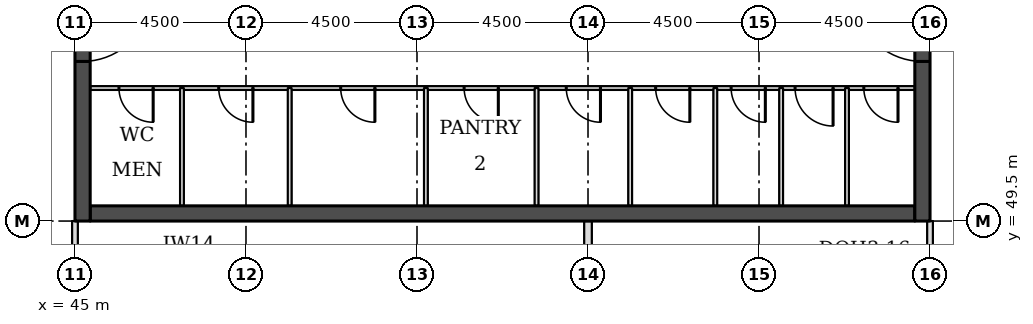
"""IFC4 building model, lengths in metres.
Left out: names, types, materials, properties, quantities, classifications, styles, units other than length and angle.
Written with IfcOpenShell. Run it as: python <this file> out.ifc"""

import sys

from ifc_helpers import new_model, si_unit, direction, frame, frame_2d, origin, place, context, subcontext, project, spatial, rectangle, extrude, element, fill, save


model = new_model("IFC4")
c1 = context("Model", 3, precision=1e-05, world=origin(), true_north=direction((0.0, 1.0)))
c2 = subcontext(c1, "Body", "Model", "MODEL_VIEW")
j1 = project(units=[si_unit("LENGTHUNIT", "METRE"), si_unit("PLANEANGLEUNIT", "RADIAN")], contexts=[c1])
p1 = place(None, origin())
s1 = spatial("IfcSite", under=j1, at=p1, CompositionType="ELEMENT")
p2 = place(p1, origin())
s2 = spatial("IfcBuilding", under=s1, at=p2, CompositionType="ELEMENT")
p3 = place(p2, frame((0.0, 0.0, 162.5)))
s3 = spatial("IfcBuildingStorey", under=s2, at=p3, CompositionType="ELEMENT", Elevation=162.5)
p4 = place(p3, frame((45.4, 49.7, 0.0), z_axis=(0.0, 0.0, 1.0), x_axis=(1.0, 0.0, 0.0)))
e1 = element("IfcWall", 1, at=p4, inside=s3, PredefinedType="SHEAR", context=c2, shape_type="SweptSolid", body=[
    extrude(rectangle(XDim=21.7, YDim=0.4, at=frame_2d((10.85, 0.0))), origin(), (0.0, 0.0, 1.0), 3.7),
])
p5 = place(p3, frame((45.2, 49.5, 0.0), z_axis=(0.0, 0.0, 1.0), x_axis=(0.0, 1.0, 0.0)))
e2 = element("IfcWall", 2, at=p5, inside=s3, PredefinedType="SHEAR", context=c2, shape_type="SweptSolid", body=[
    extrude(rectangle(XDim=22.5, YDim=0.4, at=frame_2d((11.25, 0.0))), origin(), (0.0, 0.0, 1.0), 3.7),
])
p6 = place(p5, frame((4.2, 0.0, 0.0)))
e3 = element("IfcOpeningElement", 3, at=p6, cuts=e2, PredefinedType="OPENING", context=c2, shape_type="SweptSolid", body=[
    extrude(rectangle(XDim=1.8, YDim=2.1, at=frame_2d((0.9, 1.05))), frame((0.0, 0.21, 0.0), z_axis=(0.0, -1.0, 0.0), x_axis=(1.0, 0.0, 0.0)), (0.0, 0.0, 1.0), 0.42),
])
p7 = place(p5, frame((6.9, 0.0, 0.0)))
e4 = element("IfcOpeningElement", 4, at=p7, cuts=e2, PredefinedType="OPENING", context=c2, shape_type="SweptSolid", body=[
    extrude(rectangle(XDim=1.1, YDim=2.1, at=frame_2d((0.55, 1.05))), frame((0.0, 0.21, 0.0), z_axis=(0.0, -1.0, 0.0), x_axis=(1.0, 0.0, 0.0)), (0.0, 0.0, 1.0), 0.42),
])
p8 = place(p5, frame((13.6, 0.0, 0.0)))
e5 = element("IfcOpeningElement", 5, at=p8, cuts=e2, PredefinedType="OPENING", context=c2, shape_type="SweptSolid", body=[
    extrude(rectangle(XDim=1.1, YDim=2.1, at=frame_2d((0.55, 1.05))), frame((0.0, 0.21, 0.0), z_axis=(0.0, -1.0, 0.0), x_axis=(1.0, 0.0, 0.0)), (0.0, 0.0, 1.0), 0.42),
])
p9 = place(p5, frame((16.5, 0.0, 0.0)))
e6 = element("IfcOpeningElement", 6, at=p9, cuts=e2, PredefinedType="OPENING", context=c2, shape_type="SweptSolid", body=[
    extrude(rectangle(XDim=1.8, YDim=2.1, at=frame_2d((0.9, 1.05))), frame((0.0, 0.21, 0.0), z_axis=(0.0, -1.0, 0.0), x_axis=(1.0, 0.0, 0.0)), (0.0, 0.0, 1.0), 0.42),
])
p10 = place(p3, frame((67.3, 49.5, 0.0), z_axis=(0.0, 0.0, 1.0), x_axis=(0.0, 1.0, 0.0)))
e7 = element("IfcWall", 7, at=p10, inside=s3, PredefinedType="SHEAR", context=c2, shape_type="SweptSolid", body=[
    extrude(rectangle(XDim=22.5, YDim=0.4, at=frame_2d((11.25, 0.0))), origin(), (0.0, 0.0, 1.0), 3.7),
])
p11 = place(p10, frame((4.2, 0.0, 0.0)))
e8 = element("IfcOpeningElement", 8, at=p11, cuts=e7, PredefinedType="OPENING", context=c2, shape_type="SweptSolid", body=[
    extrude(rectangle(XDim=1.8, YDim=2.1, at=frame_2d((0.9, 1.05))), frame((0.0, 0.21, 0.0), z_axis=(0.0, -1.0, 0.0), x_axis=(1.0, 0.0, 0.0)), (0.0, 0.0, 1.0), 0.42),
])
p12 = place(p10, frame((6.9, 0.0, 0.0)))
e9 = element("IfcOpeningElement", 9, at=p12, cuts=e7, PredefinedType="OPENING", context=c2, shape_type="SweptSolid", body=[
    extrude(rectangle(XDim=1.1, YDim=2.1, at=frame_2d((0.55, 1.05))), frame((0.0, 0.21, 0.0), z_axis=(0.0, -1.0, 0.0), x_axis=(1.0, 0.0, 0.0)), (0.0, 0.0, 1.0), 0.42),
])
p13 = place(p10, frame((13.6, 0.0, 0.0)))
e10 = element("IfcOpeningElement", 10, at=p13, cuts=e7, PredefinedType="OPENING", context=c2, shape_type="SweptSolid", body=[
    extrude(rectangle(XDim=1.1, YDim=2.1, at=frame_2d((0.55, 1.05))), frame((0.0, 0.21, 0.0), z_axis=(0.0, -1.0, 0.0), x_axis=(1.0, 0.0, 0.0)), (0.0, 0.0, 1.0), 0.42),
])
p14 = place(p10, frame((16.5, 0.0, 0.0)))
e11 = element("IfcOpeningElement", 11, at=p14, cuts=e7, PredefinedType="OPENING", context=c2, shape_type="SweptSolid", body=[
    extrude(rectangle(XDim=1.8, YDim=2.1, at=frame_2d((0.9, 1.05))), frame((0.0, 0.21, 0.0), z_axis=(0.0, -1.0, 0.0), x_axis=(1.0, 0.0, 0.0)), (0.0, 0.0, 1.0), 0.42),
])
p15 = place(p3, frame((58.5, 45.0, 0.0), z_axis=(0.0, 0.0, 1.0), x_axis=(0.0, 1.0, 0.0)))
e12 = element("IfcWall", 12, at=p15, inside=s3, PredefinedType="PARTITIONING", context=c2, shape_type="SweptSolid", body=[
    extrude(rectangle(XDim=4.5, YDim=0.2, at=frame_2d((2.25, 0.0))), origin(), (0.0, 0.0, 1.0), 3.55),
])
for number, where, z_axis, x_axis in (
    (13, (45.0, 48.0, 0.0), (0.0, 0.0, 1.0), (0.0, 1.0, 0.0)),
    (14, (67.5, 48.0, 0.0), (0.0, 0.0, 1.0), (0.0, 1.0, 0.0)),
):
    element("IfcWall", number, at=place(p3, frame(where, z_axis=z_axis, x_axis=x_axis)), inside=s3, PredefinedType="PARTITIONING", context=c2, shape_type="SweptSolid", body=[
        extrude(rectangle(XDim=1.5, YDim=0.15, at=frame_2d((0.75, 0.0))), origin(), (0.0, 0.0, 1.0), 3.022),
    ])
p16 = place(p3, frame((45.4, 53.0, 0.0), z_axis=(0.0, 0.0, 1.0), x_axis=(1.0, 0.0, 0.0)))
e15 = element("IfcWall", 15, at=p16, inside=s3, PredefinedType="PARTITIONING", context=c2, shape_type="SweptSolid", body=[
    extrude(rectangle(XDim=21.7, YDim=0.1, at=frame_2d((10.85, 0.0))), origin(), (0.0, 0.0, 1.0), 3.55),
])
p17 = place(p16, frame((20.357, 0.0, 0.0)))
e16 = element("IfcOpeningElement", 16, at=p17, cuts=e15, PredefinedType="OPENING", context=c2, shape_type="SweptSolid", body=[
    extrude(rectangle(XDim=0.9, YDim=2.1, at=frame_2d((0.45, 1.05))), frame((0.0, 0.06, 0.0), z_axis=(0.0, -1.0, 0.0), x_axis=(1.0, 0.0, 0.0)), (0.0, 0.0, 1.0), 0.12),
])
p18 = place(p16, frame((18.549, 0.0, 0.0)))
e17 = element("IfcOpeningElement", 17, at=p18, cuts=e15, PredefinedType="OPENING", context=c2, shape_type="SweptSolid", body=[
    extrude(rectangle(XDim=1.0, YDim=2.1, at=frame_2d((0.5, 1.05))), frame((0.0, 0.06, 0.0), z_axis=(0.0, -1.0, 0.0), x_axis=(1.0, 0.0, 0.0)), (0.0, 0.0, 1.0), 0.12),
])
p19 = place(p16, frame((16.866, 0.0, 0.0)))
e18 = element("IfcOpeningElement", 18, at=p19, cuts=e15, PredefinedType="OPENING", context=c2, shape_type="SweptSolid", body=[
    extrude(rectangle(XDim=0.9, YDim=2.1, at=frame_2d((0.45, 1.05))), frame((0.0, 0.06, 0.0), z_axis=(0.0, -1.0, 0.0), x_axis=(1.0, 0.0, 0.0)), (0.0, 0.0, 1.0), 0.12),
])
p20 = place(p16, frame((0.758, 0.0, 0.0)))
e19 = element("IfcOpeningElement", 19, at=p20, cuts=e15, PredefinedType="OPENING", context=c2, shape_type="SweptSolid", body=[
    extrude(rectangle(XDim=0.9, YDim=2.1, at=frame_2d((0.45, 1.05))), frame((0.0, 0.06, 0.0), z_axis=(0.0, -1.0, 0.0), x_axis=(1.0, 0.0, 0.0)), (0.0, 0.0, 1.0), 0.12),
])
p21 = place(p16, frame((3.383, 0.0, 0.0)))
e20 = element("IfcOpeningElement", 20, at=p21, cuts=e15, PredefinedType="OPENING", context=c2, shape_type="SweptSolid", body=[
    extrude(rectangle(XDim=0.9, YDim=2.1, at=frame_2d((0.45, 1.05))), frame((0.0, 0.06, 0.0), z_axis=(0.0, -1.0, 0.0), x_axis=(1.0, 0.0, 0.0)), (0.0, 0.0, 1.0), 0.12),
])
p22 = place(p16, frame((6.592, 0.0, 0.0)))
e21 = element("IfcOpeningElement", 21, at=p22, cuts=e15, PredefinedType="OPENING", context=c2, shape_type="SweptSolid", body=[
    extrude(rectangle(XDim=0.9, YDim=2.1, at=frame_2d((0.45, 1.05))), frame((0.0, 0.06, 0.0), z_axis=(0.0, -1.0, 0.0), x_axis=(1.0, 0.0, 0.0)), (0.0, 0.0, 1.0), 0.12),
])
p23 = place(p16, frame((9.84, 0.0, 0.0)))
e22 = element("IfcOpeningElement", 22, at=p23, cuts=e15, PredefinedType="OPENING", context=c2, shape_type="SweptSolid", body=[
    extrude(rectangle(XDim=0.9, YDim=2.1, at=frame_2d((0.45, 1.05))), frame((0.0, 0.06, 0.0), z_axis=(0.0, -1.0, 0.0), x_axis=(1.0, 0.0, 0.0)), (0.0, 0.0, 1.0), 0.12),
])
p24 = place(p16, frame((12.528, 0.0, 0.0)))
e23 = element("IfcOpeningElement", 23, at=p24, cuts=e15, PredefinedType="OPENING", context=c2, shape_type="SweptSolid", body=[
    extrude(rectangle(XDim=0.9, YDim=2.1, at=frame_2d((0.45, 1.05))), frame((0.0, 0.06, 0.0), z_axis=(0.0, -1.0, 0.0), x_axis=(1.0, 0.0, 0.0)), (0.0, 0.0, 1.0), 0.12),
])
p25 = place(p16, frame((14.88, 0.0, 0.0)))
e24 = element("IfcOpeningElement", 24, at=p25, cuts=e15, PredefinedType="OPENING", context=c2, shape_type="SweptSolid", body=[
    extrude(rectangle(XDim=0.9, YDim=2.1, at=frame_2d((0.45, 1.05))), frame((0.0, 0.06, 0.0), z_axis=(0.0, -1.0, 0.0), x_axis=(1.0, 0.0, 0.0)), (0.0, 0.0, 1.0), 0.12),
])
for number, where, z_axis, x_axis in (
    (25, (47.815, 49.9, 0.0), (0.0, 0.0, 1.0), (0.0, 1.0, 0.0)),
    (26, (50.65, 49.9, 0.0), (0.0, 0.0, 1.0), (0.0, 1.0, 0.0)),
    (27, (54.234, 49.9, 0.0), (0.0, 0.0, 1.0), (0.0, 1.0, 0.0)),
    (28, (57.146, 49.9, 0.0), (0.0, 0.0, 1.0), (0.0, 1.0, 0.0)),
    (29, (59.61, 49.9, 0.0), (0.0, 0.0, 1.0), (0.0, 1.0, 0.0)),
    (30, (61.85, 49.9, 0.0), (0.0, 0.0, 1.0), (0.0, 1.0, 0.0)),
    (31, (63.583, 49.9, 0.0), (0.0, 0.0, 1.0), (0.0, 1.0, 0.0)),
    (32, (65.315, 49.9, 0.0), (0.0, 0.0, 1.0), (0.0, 1.0, 0.0)),
):
    element("IfcWall", number, at=place(p3, frame(where, z_axis=z_axis, x_axis=x_axis)), inside=s3, PredefinedType="PARTITIONING", context=c2, shape_type="SweptSolid", body=[
        extrude(rectangle(XDim=3.1, YDim=0.1, at=frame_2d((1.55, 0.0))), origin(), (0.0, 0.0, 1.0), 3.55),
    ])
p26 = place(p6, frame((1.8, 0.0, 0.0), z_axis=(0.0, 0.0, 1.0), x_axis=(-1.0, 0.0, 0.0)))
e33 = element("IfcDoor", 33, at=p26, inside=s3, OperationType="SINGLE_SWING_LEFT", PredefinedType="DOOR", context=c2, shape_type="SweptSolid", body=[
    extrude(rectangle(XDim=1.8, YDim=2.1, at=frame_2d((0.9, 1.05))), frame((0.0, 0.025, 0.0), z_axis=(0.0, -1.0, 0.0), x_axis=(1.0, 0.0, 0.0)), (0.0, 0.0, 1.0), 0.05),
])
fill(e3, e33)
p27 = place(p11, origin())
e34 = element("IfcDoor", 34, at=p27, inside=s3, OperationType="SINGLE_SWING_RIGHT", PredefinedType="DOOR", context=c2, shape_type="SweptSolid", body=[
    extrude(rectangle(XDim=1.8, YDim=2.1, at=frame_2d((0.9, 1.05))), frame((0.0, 0.025, 0.0), z_axis=(0.0, -1.0, 0.0), x_axis=(1.0, 0.0, 0.0)), (0.0, 0.0, 1.0), 0.05),
])
fill(e8, e34)
p28 = place(p17, frame((0.9, 0.0, 0.0), z_axis=(0.0, 0.0, 1.0), x_axis=(-1.0, 0.0, 0.0)))
e35 = element("IfcDoor", 35, at=p28, inside=s3, OperationType="SINGLE_SWING_LEFT", PredefinedType="DOOR", context=c2, shape_type="SweptSolid", body=[
    extrude(rectangle(XDim=0.9, YDim=2.1, at=frame_2d((0.45, 1.05))), frame((0.0, 0.025, 0.0), z_axis=(0.0, -1.0, 0.0), x_axis=(1.0, 0.0, 0.0)), (0.0, 0.0, 1.0), 0.05),
])
fill(e16, e35)
p29 = place(p18, frame((1.0, 0.0, 0.0), z_axis=(0.0, 0.0, 1.0), x_axis=(-1.0, 0.0, 0.0)))
e36 = element("IfcDoor", 36, at=p29, inside=s3, OperationType="SINGLE_SWING_LEFT", PredefinedType="DOOR", context=c2, shape_type="SweptSolid", body=[
    extrude(rectangle(XDim=1.0, YDim=2.1, at=frame_2d((0.5, 1.05))), frame((0.0, 0.025, 0.0), z_axis=(0.0, -1.0, 0.0), x_axis=(1.0, 0.0, 0.0)), (0.0, 0.0, 1.0), 0.05),
])
fill(e17, e36)
p30 = place(p19, frame((0.9, 0.0, 0.0), z_axis=(0.0, 0.0, 1.0), x_axis=(-1.0, 0.0, 0.0)))
e37 = element("IfcDoor", 37, at=p30, inside=s3, OperationType="SINGLE_SWING_LEFT", PredefinedType="DOOR", context=c2, shape_type="SweptSolid", body=[
    extrude(rectangle(XDim=0.9, YDim=2.1, at=frame_2d((0.45, 1.05))), frame((0.0, 0.025, 0.0), z_axis=(0.0, -1.0, 0.0), x_axis=(1.0, 0.0, 0.0)), (0.0, 0.0, 1.0), 0.05),
])
fill(e18, e37)
p31 = place(p20, frame((0.9, 0.0, 0.0), z_axis=(0.0, 0.0, 1.0), x_axis=(-1.0, 0.0, 0.0)))
e38 = element("IfcDoor", 38, at=p31, inside=s3, OperationType="SINGLE_SWING_LEFT", PredefinedType="DOOR", context=c2, shape_type="SweptSolid", body=[
    extrude(rectangle(XDim=0.9, YDim=2.1, at=frame_2d((0.45, 1.05))), frame((0.0, 0.025, 0.0), z_axis=(0.0, -1.0, 0.0), x_axis=(1.0, 0.0, 0.0)), (0.0, 0.0, 1.0), 0.05),
])
fill(e19, e38)
p32 = place(p21, frame((0.9, 0.0, 0.0), z_axis=(0.0, 0.0, 1.0), x_axis=(-1.0, 0.0, 0.0)))
e39 = element("IfcDoor", 39, at=p32, inside=s3, OperationType="SINGLE_SWING_LEFT", PredefinedType="DOOR", context=c2, shape_type="SweptSolid", body=[
    extrude(rectangle(XDim=0.9, YDim=2.1, at=frame_2d((0.45, 1.05))), frame((0.0, 0.025, 0.0), z_axis=(0.0, -1.0, 0.0), x_axis=(1.0, 0.0, 0.0)), (0.0, 0.0, 1.0), 0.05),
])
fill(e20, e39)
p33 = place(p22, frame((0.9, 0.0, 0.0), z_axis=(0.0, 0.0, 1.0), x_axis=(-1.0, 0.0, 0.0)))
e40 = element("IfcDoor", 40, at=p33, inside=s3, OperationType="SINGLE_SWING_LEFT", PredefinedType="DOOR", context=c2, shape_type="SweptSolid", body=[
    extrude(rectangle(XDim=0.9, YDim=2.1, at=frame_2d((0.45, 1.05))), frame((0.0, 0.025, 0.0), z_axis=(0.0, -1.0, 0.0), x_axis=(1.0, 0.0, 0.0)), (0.0, 0.0, 1.0), 0.05),
])
fill(e21, e40)
p34 = place(p23, frame((0.9, 0.0, 0.0), z_axis=(0.0, 0.0, 1.0), x_axis=(-1.0, 0.0, 0.0)))
e41 = element("IfcDoor", 41, at=p34, inside=s3, OperationType="SINGLE_SWING_LEFT", PredefinedType="DOOR", context=c2, shape_type="SweptSolid", body=[
    extrude(rectangle(XDim=0.9, YDim=2.1, at=frame_2d((0.45, 1.05))), frame((0.0, 0.025, 0.0), z_axis=(0.0, -1.0, 0.0), x_axis=(1.0, 0.0, 0.0)), (0.0, 0.0, 1.0), 0.05),
])
fill(e22, e41)
p35 = place(p24, frame((0.9, 0.0, 0.0), z_axis=(0.0, 0.0, 1.0), x_axis=(-1.0, 0.0, 0.0)))
e42 = element("IfcDoor", 42, at=p35, inside=s3, OperationType="SINGLE_SWING_LEFT", PredefinedType="DOOR", context=c2, shape_type="SweptSolid", body=[
    extrude(rectangle(XDim=0.9, YDim=2.1, at=frame_2d((0.45, 1.05))), frame((0.0, 0.025, 0.0), z_axis=(0.0, -1.0, 0.0), x_axis=(1.0, 0.0, 0.0)), (0.0, 0.0, 1.0), 0.05),
])
fill(e23, e42)
p36 = place(p25, frame((0.9, 0.0, 0.0), z_axis=(0.0, 0.0, 1.0), x_axis=(-1.0, 0.0, 0.0)))
e43 = element("IfcDoor", 43, at=p36, inside=s3, OperationType="SINGLE_SWING_LEFT", PredefinedType="DOOR", context=c2, shape_type="SweptSolid", body=[
    extrude(rectangle(XDim=0.9, YDim=2.1, at=frame_2d((0.45, 1.05))), frame((0.0, 0.025, 0.0), z_axis=(0.0, -1.0, 0.0), x_axis=(1.0, 0.0, 0.0)), (0.0, 0.0, 1.0), 0.05),
])
fill(e24, e43)
save(model, sys.argv[1])
